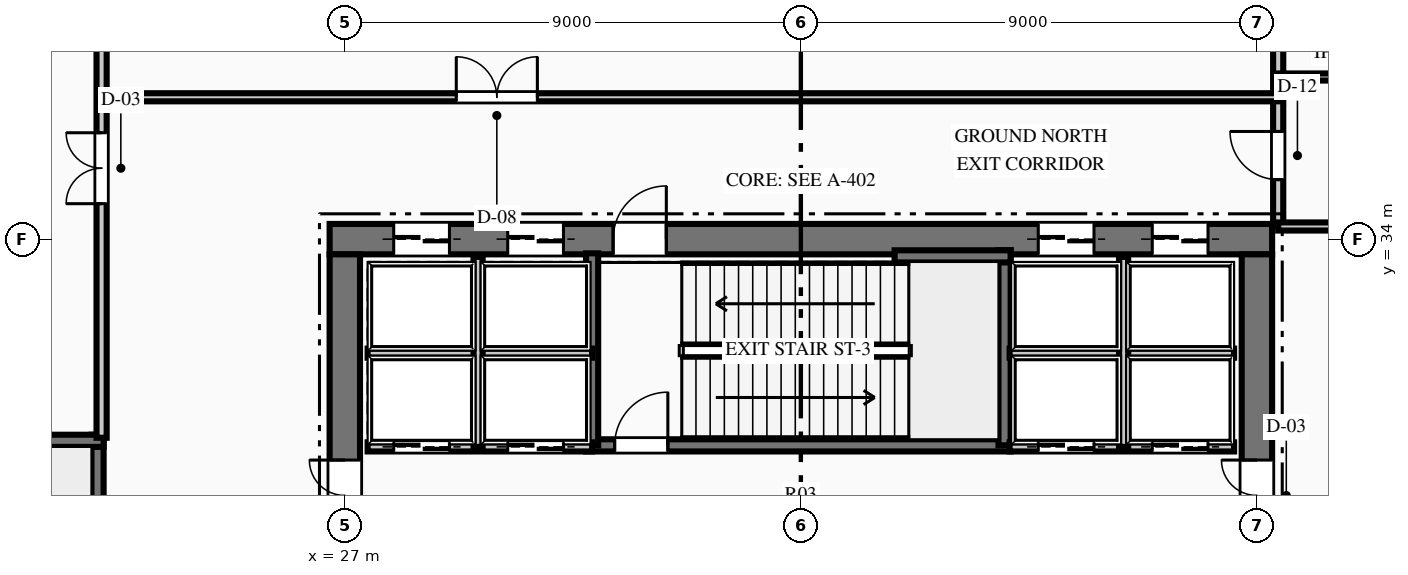
"""IFC4 building model, lengths in metres.
Left out: names, types, materials, properties, quantities, classifications, styles, units other than length and angle.
Written with IfcOpenShell. Run it as: python <this file> out.ifc"""

import sys

from ifc_helpers import new_model, si_unit, direction, frame, frame_2d, origin, place, context, subcontext, project, spatial, rectangle, extrude, element, fill, save


model = new_model("IFC4")
c1 = context("Model", 3, precision=1e-05, world=origin(), true_north=direction((0.0, 1.0)))
c2 = subcontext(c1, "Body", "Model", "MODEL_VIEW")
j1 = project(units=[si_unit("LENGTHUNIT", "METRE"), si_unit("PLANEANGLEUNIT", "RADIAN")], contexts=[c1])
p1 = place(None, origin())
s1 = spatial("IfcSite", under=j1, at=p1, CompositionType="ELEMENT")
p2 = place(p1, origin())
s2 = spatial("IfcBuilding", under=s1, at=p2, CompositionType="ELEMENT")
p3 = place(p2, origin())
s3 = spatial("IfcBuildingStorey", under=s2, at=p3, CompositionType="ELEMENT", Elevation=0.0)
p4 = place(p3, frame((26.7, 34.0, 0.0), z_axis=(0.0, 0.0, 1.0), x_axis=(1.0, 0.0, 0.0)))
e1 = element("IfcWall", 1, at=p4, inside=s3, PredefinedType="SHEAR", context=c2, shape_type="SweptSolid", body=[
    extrude(rectangle(XDim=18.6, YDim=0.6, at=frame_2d((9.3, 0.0))), origin(), (0.0, 0.0, 1.0), 6.0),
])
p5 = place(p4, frame((5.595, 0.0, 0.0)))
e2 = element("IfcOpeningElement", 2, at=p5, cuts=e1, PredefinedType="OPENING", context=c2, shape_type="SweptSolid", body=[
    extrude(rectangle(XDim=1.05, YDim=2.15, at=frame_2d((0.525, 1.075))), frame((0.0, 0.31, 0.0), z_axis=(0.0, -1.0, 0.0), x_axis=(1.0, 0.0, 0.0)), (0.0, 0.0, 1.0), 0.62),
])
p6 = place(p4, frame((1.265, 0.0, 0.0)))
e3 = element("IfcOpeningElement", 3, at=p6, cuts=e1, PredefinedType="OPENING", context=c2, shape_type="SweptSolid", body=[
    extrude(rectangle(XDim=1.1, YDim=2.15, at=frame_2d((0.55, 1.075))), frame((0.0, 0.31, 0.0), z_axis=(0.0, -1.0, 0.0), x_axis=(1.0, 0.0, 0.0)), (0.0, 0.0, 1.0), 0.62),
])
p7 = place(p4, frame((3.515, 0.0, 0.0)))
e4 = element("IfcOpeningElement", 4, at=p7, cuts=e1, PredefinedType="OPENING", context=c2, shape_type="SweptSolid", body=[
    extrude(rectangle(XDim=1.1, YDim=2.15, at=frame_2d((0.55, 1.075))), frame((0.0, 0.31, 0.0), z_axis=(0.0, -1.0, 0.0), x_axis=(1.0, 0.0, 0.0)), (0.0, 0.0, 1.0), 0.62),
])
p8 = place(p4, frame((13.985, 0.0, 0.0)))
e5 = element("IfcOpeningElement", 5, at=p8, cuts=e1, PredefinedType="OPENING", context=c2, shape_type="SweptSolid", body=[
    extrude(rectangle(XDim=1.1, YDim=2.15, at=frame_2d((0.55, 1.075))), frame((0.0, 0.31, 0.0), z_axis=(0.0, -1.0, 0.0), x_axis=(1.0, 0.0, 0.0)), (0.0, 0.0, 1.0), 0.62),
])
p9 = place(p4, frame((16.235, 0.0, 0.0)))
e6 = element("IfcOpeningElement", 6, at=p9, cuts=e1, PredefinedType="OPENING", context=c2, shape_type="SweptSolid", body=[
    extrude(rectangle(XDim=1.1, YDim=2.15, at=frame_2d((0.55, 1.075))), frame((0.0, 0.31, 0.0), z_axis=(0.0, -1.0, 0.0), x_axis=(1.0, 0.0, 0.0)), (0.0, 0.0, 1.0), 0.62),
])
p10 = place(p3, frame((27.0, 18.3, 0.0), z_axis=(0.0, 0.0, 1.0), x_axis=(0.0, 1.0, 0.0)))
e7 = element("IfcWall", 7, at=p10, inside=s3, PredefinedType="SHEAR", context=c2, shape_type="SweptSolid", body=[
    extrude(rectangle(XDim=15.4, YDim=0.6, at=frame_2d((7.7, 0.0))), origin(), (0.0, 0.0, 1.0), 6.0),
])
p11 = place(p10, frame((9.94, 0.0, 0.0)))
e8 = element("IfcOpeningElement", 8, at=p11, cuts=e7, PredefinedType="OPENING", context=c2, shape_type="SweptSolid", body=[
    extrude(rectangle(XDim=1.4, YDim=2.2, at=frame_2d((0.7, 1.1))), frame((0.0, 0.31, 0.0), z_axis=(0.0, -1.0, 0.0), x_axis=(1.0, 0.0, 0.0)), (0.0, 0.0, 1.0), 0.62),
])
p12 = place(p3, frame((45.0, 18.3, 0.0), z_axis=(0.0, 0.0, 1.0), x_axis=(0.0, 1.0, 0.0)))
e9 = element("IfcWall", 9, at=p12, inside=s3, PredefinedType="SHEAR", context=c2, shape_type="SweptSolid", body=[
    extrude(rectangle(XDim=15.4, YDim=0.6, at=frame_2d((7.7, 0.0))), origin(), (0.0, 0.0, 1.0), 6.0),
])
p13 = place(p12, frame((9.94, 0.0, 0.0)))
e10 = element("IfcOpeningElement", 10, at=p13, cuts=e9, PredefinedType="OPENING", context=c2, shape_type="SweptSolid", body=[
    extrude(rectangle(XDim=1.4, YDim=2.2, at=frame_2d((0.7, 1.1))), frame((0.0, 0.31, 0.0), z_axis=(0.0, -1.0, 0.0), x_axis=(1.0, 0.0, 0.0)), (0.0, 0.0, 1.0), 0.62),
])
p14 = place(p3, frame((31.76, 29.93, 0.0), z_axis=(0.0, 0.0, 1.0), x_axis=(1.0, 0.0, 0.0)))
e11 = element("IfcWall", 11, at=p14, inside=s3, PredefinedType="SHEAR", context=c2, shape_type="SweptSolid", body=[
    extrude(rectangle(XDim=8.38, YDim=0.24, at=frame_2d((4.19, 0.0))), origin(), (0.0, 0.0, 1.0), 6.0),
])
p15 = place(p14, frame((0.565, 0.0, 0.0)))
e12 = element("IfcOpeningElement", 12, at=p15, cuts=e11, PredefinedType="OPENING", context=c2, shape_type="SweptSolid", body=[
    extrude(rectangle(XDim=1.05, YDim=2.15, at=frame_2d((0.525, 1.075))), frame((0.0, 0.13, 0.0), z_axis=(0.0, -1.0, 0.0), x_axis=(1.0, 0.0, 0.0)), (0.0, 0.0, 1.0), 0.26),
])
p16 = place(p3, frame((31.88, 29.93, 0.0), z_axis=(0.0, 0.0, 1.0), x_axis=(0.0, 1.0, 0.0)))
e13 = element("IfcWall", 13, at=p16, inside=s3, PredefinedType="SHEAR", context=c2, shape_type="SweptSolid", body=[
    extrude(rectangle(XDim=3.79, YDim=0.24, at=frame_2d((1.895, 0.0))), origin(), (0.0, 0.0, 1.0), 6.0),
])
p17 = place(p3, frame((40.02, 29.93, 0.0), z_axis=(0.0, 0.0, 1.0), x_axis=(0.0, 1.0, 0.0)))
e14 = element("IfcWall", 14, at=p17, inside=s3, PredefinedType="SHEAR", context=c2, shape_type="SweptSolid", body=[
    extrude(rectangle(XDim=3.85, YDim=0.24, at=frame_2d((1.925, 0.0))), origin(), (0.0, 0.0, 1.0), 6.0),
])
p18 = place(p3, frame((37.85, 33.66, 0.0), z_axis=(0.0, 0.0, 1.0), x_axis=(1.0, 0.0, 0.0)))
e15 = element("IfcWall", 15, at=p18, inside=s3, PredefinedType="SHEAR", context=c2, shape_type="SweptSolid", body=[
    extrude(rectangle(XDim=2.29, YDim=0.24, at=frame_2d((1.145, 0.0))), origin(), (0.0, 0.0, 1.0), 6.0),
])
p19 = place(p3, frame((22.12, 21.76, 0.0), z_axis=(0.0, 0.0, 1.0), x_axis=(0.0, 1.0, 0.0)))
e16 = element("IfcWall", 16, at=p19, inside=s3, PredefinedType="SHEAR", context=c2, shape_type="SweptSolid", body=[
    extrude(rectangle(XDim=8.38, YDim=0.24, at=frame_2d((4.19, 0.0))), origin(), (0.0, 0.0, 1.0), 6.0),
])
p20 = place(p3, frame((18.26, 30.02, 0.0), z_axis=(0.0, 0.0, 1.0), x_axis=(1.0, 0.0, 0.0)))
e17 = element("IfcWall", 17, at=p20, inside=s3, PredefinedType="SHEAR", context=c2, shape_type="SweptSolid", body=[
    extrude(rectangle(XDim=3.98, YDim=0.24, at=frame_2d((1.99, 0.0))), origin(), (0.0, 0.0, 1.0), 6.0),
])
p21 = place(p3, frame((27.45, 29.9, 0.0), z_axis=(0.0, 0.0, 1.0), x_axis=(1.0, 0.0, 0.0)))
e18 = element("IfcWall", 18, at=p21, inside=s3, PredefinedType="PARTITIONING", context=c2, shape_type="SweptSolid", body=[
    extrude(rectangle(XDim=4.43, YDim=0.18, at=frame_2d((2.215, 0.0))), origin(), (0.0, 0.0, 1.0), 5.67),
])
p22 = place(p21, frame((0.515, 0.0, 0.0)))
e19 = element("IfcOpeningElement", 19, at=p22, cuts=e18, PredefinedType="OPENING", context=c2, shape_type="SweptSolid", body=[
    extrude(rectangle(XDim=1.1, YDim=2.15, at=frame_2d((0.55, 1.075))), frame((0.0, 0.1, 0.0), z_axis=(0.0, -1.0, 0.0), x_axis=(1.0, 0.0, 0.0)), (0.0, 0.0, 1.0), 0.2),
])
p23 = place(p21, frame((2.765, 0.0, 0.0)))
e20 = element("IfcOpeningElement", 20, at=p23, cuts=e18, PredefinedType="OPENING", context=c2, shape_type="SweptSolid", body=[
    extrude(rectangle(XDim=1.1, YDim=2.15, at=frame_2d((0.55, 1.075))), frame((0.0, 0.1, 0.0), z_axis=(0.0, -1.0, 0.0), x_axis=(1.0, 0.0, 0.0)), (0.0, 0.0, 1.0), 0.2),
])
p24 = place(p3, frame((27.45, 31.75, 0.0), z_axis=(0.0, 0.0, 1.0), x_axis=(1.0, 0.0, 0.0)))
e21 = element("IfcWall", 21, at=p24, inside=s3, PredefinedType="PARTITIONING", context=c2, shape_type="SweptSolid", body=[
    extrude(rectangle(XDim=4.43, YDim=0.18, at=frame_2d((2.215, 0.0))), origin(), (0.0, 0.0, 1.0), 5.67),
])
p25 = place(p3, frame((29.63, 29.9, 0.0), z_axis=(0.0, 0.0, 1.0), x_axis=(0.0, 1.0, 0.0)))
e22 = element("IfcWall", 22, at=p25, inside=s3, PredefinedType="PARTITIONING", context=c2, shape_type="SweptSolid", body=[
    extrude(rectangle(XDim=3.75, YDim=0.18, at=frame_2d((1.875, 0.0))), origin(), (0.0, 0.0, 1.0), 5.67),
])
p26 = place(p3, frame((40.12, 29.9, 0.0), z_axis=(0.0, 0.0, 1.0), x_axis=(1.0, 0.0, 0.0)))
e23 = element("IfcWall", 23, at=p26, inside=s3, PredefinedType="PARTITIONING", context=c2, shape_type="SweptSolid", body=[
    extrude(rectangle(XDim=4.43, YDim=0.18, at=frame_2d((2.215, 0.0))), origin(), (0.0, 0.0, 1.0), 5.67),
])
p27 = place(p26, frame((0.565, 0.0, 0.0)))
e24 = element("IfcOpeningElement", 24, at=p27, cuts=e23, PredefinedType="OPENING", context=c2, shape_type="SweptSolid", body=[
    extrude(rectangle(XDim=1.1, YDim=2.15, at=frame_2d((0.55, 1.075))), frame((0.0, 0.1, 0.0), z_axis=(0.0, -1.0, 0.0), x_axis=(1.0, 0.0, 0.0)), (0.0, 0.0, 1.0), 0.2),
])
p28 = place(p26, frame((2.815, 0.0, 0.0)))
e25 = element("IfcOpeningElement", 25, at=p28, cuts=e23, PredefinedType="OPENING", context=c2, shape_type="SweptSolid", body=[
    extrude(rectangle(XDim=1.1, YDim=2.15, at=frame_2d((0.55, 1.075))), frame((0.0, 0.1, 0.0), z_axis=(0.0, -1.0, 0.0), x_axis=(1.0, 0.0, 0.0)), (0.0, 0.0, 1.0), 0.2),
])
p29 = place(p3, frame((40.12, 31.75, 0.0), z_axis=(0.0, 0.0, 1.0), x_axis=(1.0, 0.0, 0.0)))
e26 = element("IfcWall", 26, at=p29, inside=s3, PredefinedType="PARTITIONING", context=c2, shape_type="SweptSolid", body=[
    extrude(rectangle(XDim=4.43, YDim=0.18, at=frame_2d((2.215, 0.0))), origin(), (0.0, 0.0, 1.0), 5.67),
])
p30 = place(p3, frame((42.37, 29.9, 0.0), z_axis=(0.0, 0.0, 1.0), x_axis=(0.0, 1.0, 0.0)))
e27 = element("IfcWall", 27, at=p30, inside=s3, PredefinedType="PARTITIONING", context=c2, shape_type="SweptSolid", body=[
    extrude(rectangle(XDim=3.75, YDim=0.18, at=frame_2d((1.875, 0.0))), origin(), (0.0, 0.0, 1.0), 5.67),
])
p31 = place(p3, frame((22.2, 30.08, 0.0), z_axis=(0.0, 0.0, 1.0), x_axis=(0.0, 1.0, 0.0)))
e28 = element("IfcWall", 28, at=p31, inside=s3, PredefinedType="PARTITIONING", context=c2, shape_type="SweptSolid", body=[
    extrude(rectangle(XDim=19.37, YDim=0.2, at=frame_2d((9.685, 0.0))), origin(), (0.0, 0.0, 1.0), 5.67),
])
p32 = place(p31, frame((4.62, 0.0, 0.0)))
e29 = element("IfcOpeningElement", 29, at=p32, cuts=e28, PredefinedType="OPENING", context=c2, shape_type="SweptSolid", body=[
    extrude(rectangle(XDim=1.4, YDim=2.2, at=frame_2d((0.7, 1.1))), frame((0.0, 0.11, 0.0), z_axis=(0.0, -1.0, 0.0), x_axis=(1.0, 0.0, 0.0)), (0.0, 0.0, 1.0), 0.22),
])
p33 = place(p3, frame((45.42, 34.25, 0.0), z_axis=(0.0, 0.0, 1.0), x_axis=(0.0, 1.0, 0.0)))
e30 = element("IfcWall", 30, at=p33, inside=s3, PredefinedType="PARTITIONING", context=c2, shape_type="SweptSolid", body=[
    extrude(rectangle(XDim=15.2, YDim=0.2, at=frame_2d((7.6, 0.0))), origin(), (0.0, 0.0, 1.0), 4.803),
])
p34 = place(p33, frame((0.925, 0.0, 0.0)))
e31 = element("IfcOpeningElement", 31, at=p34, cuts=e30, PredefinedType="OPENING", context=c2, shape_type="SweptSolid", body=[
    extrude(rectangle(XDim=0.95, YDim=2.15, at=frame_2d((0.475, 1.075))), frame((0.0, 0.11, 0.0), z_axis=(0.0, -1.0, 0.0), x_axis=(1.0, 0.0, 0.0)), (0.0, 0.0, 1.0), 0.22),
])
p35 = place(p33, frame((4.025, 0.0, 0.0)))
e32 = element("IfcOpeningElement", 32, at=p35, cuts=e30, PredefinedType="OPENING", context=c2, shape_type="SweptSolid", body=[
    extrude(rectangle(XDim=0.95, YDim=2.15, at=frame_2d((0.475, 1.075))), frame((0.0, 0.11, 0.0), z_axis=(0.0, -1.0, 0.0), x_axis=(1.0, 0.0, 0.0)), (0.0, 0.0, 1.0), 0.22),
])
p36 = place(p33, frame((7.0, 0.0, 0.0)))
e33 = element("IfcOpeningElement", 33, at=p36, cuts=e30, PredefinedType="OPENING", context=c2, shape_type="SweptSolid", body=[
    extrude(rectangle(XDim=1.0, YDim=2.15, at=frame_2d((0.5, 1.075))), frame((0.0, 0.11, 0.0), z_axis=(0.0, -1.0, 0.0), x_axis=(1.0, 0.0, 0.0)), (0.0, 0.0, 1.0), 0.22),
])
p37 = place(p3, frame((45.42, 34.25, 0.0), z_axis=(0.0, 0.0, 1.0), x_axis=(1.0, 0.0, 0.0)))
e34 = element("IfcWall", 34, at=p37, inside=s3, PredefinedType="PARTITIONING", context=c2, shape_type="SweptSolid", body=[
    extrude(rectangle(XDim=4.38, YDim=0.16, at=frame_2d((2.19, 0.0))), origin(), (0.0, 0.0, 1.0), 4.803),
])
p38 = place(p3, frame((45.42, 37.2, 0.0), z_axis=(0.0, 0.0, 1.0), x_axis=(1.0, 0.0, 0.0)))
e35 = element("IfcWall", 35, at=p38, inside=s3, PredefinedType="PARTITIONING", context=c2, shape_type="SweptSolid", body=[
    extrude(rectangle(XDim=4.38, YDim=0.14, at=frame_2d((2.19, 0.0))), origin(), (0.0, 0.0, 1.0), 5.67),
])
p39 = place(p3, frame((22.2, 36.8, 0.0), z_axis=(0.0, 0.0, 1.0), x_axis=(1.0, 0.0, 0.0)))
e36 = element("IfcWall", 36, at=p39, inside=s3, PredefinedType="PARTITIONING", context=c2, shape_type="SweptSolid", body=[
    extrude(rectangle(XDim=23.22, YDim=0.16, at=frame_2d((11.61, 0.0))), origin(), (0.0, 0.0, 1.0), 5.67),
])
p40 = place(p39, frame((7.0, 0.0, 0.0)))
e37 = element("IfcOpeningElement", 37, at=p40, cuts=e36, PredefinedType="OPENING", context=c2, shape_type="SweptSolid", body=[
    extrude(rectangle(XDim=1.6, YDim=2.2, at=frame_2d((0.8, 1.1))), frame((0.0, 0.09, 0.0), z_axis=(0.0, -1.0, 0.0), x_axis=(1.0, 0.0, 0.0)), (0.0, 0.0, 1.0), 0.18),
])
p41 = place(p15, origin())
e38 = element("IfcDoor", 38, at=p41, inside=s3, OperationType="SINGLE_SWING_RIGHT", PredefinedType="DOOR", context=c2, shape_type="SweptSolid", body=[
    extrude(rectangle(XDim=1.05, YDim=2.15, at=frame_2d((0.525, 1.075))), frame((0.0, 0.025, 0.0), z_axis=(0.0, -1.0, 0.0), x_axis=(1.0, 0.0, 0.0)), (0.0, 0.0, 1.0), 0.05),
])
fill(e12, e38)
p42 = place(p11, origin())
e39 = element("IfcDoor", 39, at=p42, inside=s3, OperationType="DOUBLE_DOOR_SINGLE_SWING", PredefinedType="DOOR", context=c2, shape_type="SweptSolid", body=[
    extrude(rectangle(XDim=1.4, YDim=2.2, at=frame_2d((0.7, 1.1))), frame((0.0, 0.025, 0.0), z_axis=(0.0, -1.0, 0.0), x_axis=(1.0, 0.0, 0.0)), (0.0, 0.0, 1.0), 0.05),
])
fill(e8, e39)
p43 = place(p13, origin())
e40 = element("IfcDoor", 40, at=p43, inside=s3, OperationType="DOUBLE_DOOR_SINGLE_SWING", PredefinedType="DOOR", context=c2, shape_type="SweptSolid", body=[
    extrude(rectangle(XDim=1.4, YDim=2.2, at=frame_2d((0.7, 1.1))), frame((0.0, 0.025, 0.0), z_axis=(0.0, -1.0, 0.0), x_axis=(1.0, 0.0, 0.0)), (0.0, 0.0, 1.0), 0.05),
])
fill(e10, e40)
p44 = place(p5, origin())
e41 = element("IfcDoor", 41, at=p44, inside=s3, OperationType="SINGLE_SWING_RIGHT", PredefinedType="DOOR", context=c2, shape_type="SweptSolid", body=[
    extrude(rectangle(XDim=1.05, YDim=2.15, at=frame_2d((0.525, 1.075))), frame((0.0, 0.025, 0.0), z_axis=(0.0, -1.0, 0.0), x_axis=(1.0, 0.0, 0.0)), (0.0, 0.0, 1.0), 0.05),
])
fill(e2, e41)
p45 = place(p32, origin())
e42 = element("IfcDoor", 42, at=p45, inside=s3, OperationType="DOUBLE_DOOR_SINGLE_SWING", PredefinedType="DOOR", context=c2, shape_type="SweptSolid", body=[
    extrude(rectangle(XDim=1.4, YDim=2.2, at=frame_2d((0.7, 1.1))), frame((0.0, 0.025, 0.0), z_axis=(0.0, -1.0, 0.0), x_axis=(1.0, 0.0, 0.0)), (0.0, 0.0, 1.0), 0.05),
])
fill(e29, e42)
p46 = place(p34, origin())
e43 = element("IfcDoor", 43, at=p46, inside=s3, OperationType="SINGLE_SWING_RIGHT", PredefinedType="DOOR", context=c2, shape_type="SweptSolid", body=[
    extrude(rectangle(XDim=0.95, YDim=2.15, at=frame_2d((0.475, 1.075))), frame((0.0, 0.025, 0.0), z_axis=(0.0, -1.0, 0.0), x_axis=(1.0, 0.0, 0.0)), (0.0, 0.0, 1.0), 0.05),
])
fill(e31, e43)
p47 = place(p40, origin())
e44 = element("IfcDoor", 44, at=p47, inside=s3, OperationType="DOUBLE_DOOR_SINGLE_SWING", PredefinedType="DOOR", context=c2, shape_type="SweptSolid", body=[
    extrude(rectangle(XDim=1.6, YDim=2.2, at=frame_2d((0.8, 1.1))), frame((0.0, 0.025, 0.0), z_axis=(0.0, -1.0, 0.0), x_axis=(1.0, 0.0, 0.0)), (0.0, 0.0, 1.0), 0.05),
])
fill(e37, e44)
p48 = place(p22, origin())
e45 = element("IfcDoor", 45, at=p48, inside=s3, OperationType="SLIDING_TO_LEFT", PredefinedType="DOOR", context=c2, shape_type="SweptSolid", body=[
    extrude(rectangle(XDim=1.1, YDim=2.15, at=frame_2d((0.55, 1.075))), frame((0.0, 0.025, 0.0), z_axis=(0.0, -1.0, 0.0), x_axis=(1.0, 0.0, 0.0)), (0.0, 0.0, 1.0), 0.05),
])
fill(e19, e45)
p49 = place(p23, origin())
e46 = element("IfcDoor", 46, at=p49, inside=s3, OperationType="SLIDING_TO_LEFT", PredefinedType="DOOR", context=c2, shape_type="SweptSolid", body=[
    extrude(rectangle(XDim=1.1, YDim=2.15, at=frame_2d((0.55, 1.075))), frame((0.0, 0.025, 0.0), z_axis=(0.0, -1.0, 0.0), x_axis=(1.0, 0.0, 0.0)), (0.0, 0.0, 1.0), 0.05),
])
fill(e20, e46)
p50 = place(p6, origin())
e47 = element("IfcDoor", 47, at=p50, inside=s3, OperationType="SLIDING_TO_LEFT", PredefinedType="DOOR", context=c2, shape_type="SweptSolid", body=[
    extrude(rectangle(XDim=1.1, YDim=2.15, at=frame_2d((0.55, 1.075))), frame((0.0, 0.025, 0.0), z_axis=(0.0, -1.0, 0.0), x_axis=(1.0, 0.0, 0.0)), (0.0, 0.0, 1.0), 0.05),
])
fill(e3, e47)
p51 = place(p7, origin())
e48 = element("IfcDoor", 48, at=p51, inside=s3, OperationType="SLIDING_TO_LEFT", PredefinedType="DOOR", context=c2, shape_type="SweptSolid", body=[
    extrude(rectangle(XDim=1.1, YDim=2.15, at=frame_2d((0.55, 1.075))), frame((0.0, 0.025, 0.0), z_axis=(0.0, -1.0, 0.0), x_axis=(1.0, 0.0, 0.0)), (0.0, 0.0, 1.0), 0.05),
])
fill(e4, e48)
p52 = place(p27, origin())
e49 = element("IfcDoor", 49, at=p52, inside=s3, OperationType="SLIDING_TO_LEFT", PredefinedType="DOOR", context=c2, shape_type="SweptSolid", body=[
    extrude(rectangle(XDim=1.1, YDim=2.15, at=frame_2d((0.55, 1.075))), frame((0.0, 0.025, 0.0), z_axis=(0.0, -1.0, 0.0), x_axis=(1.0, 0.0, 0.0)), (0.0, 0.0, 1.0), 0.05),
])
fill(e24, e49)
p53 = place(p28, origin())
e50 = element("IfcDoor", 50, at=p53, inside=s3, OperationType="SLIDING_TO_LEFT", PredefinedType="DOOR", context=c2, shape_type="SweptSolid", body=[
    extrude(rectangle(XDim=1.1, YDim=2.15, at=frame_2d((0.55, 1.075))), frame((0.0, 0.025, 0.0), z_axis=(0.0, -1.0, 0.0), x_axis=(1.0, 0.0, 0.0)), (0.0, 0.0, 1.0), 0.05),
])
fill(e25, e50)
p54 = place(p8, origin())
e51 = element("IfcDoor", 51, at=p54, inside=s3, OperationType="SLIDING_TO_LEFT", PredefinedType="DOOR", context=c2, shape_type="SweptSolid", body=[
    extrude(rectangle(XDim=1.1, YDim=2.15, at=frame_2d((0.55, 1.075))), frame((0.0, 0.025, 0.0), z_axis=(0.0, -1.0, 0.0), x_axis=(1.0, 0.0, 0.0)), (0.0, 0.0, 1.0), 0.05),
])
fill(e5, e51)
p55 = place(p9, origin())
e52 = element("IfcDoor", 52, at=p55, inside=s3, OperationType="SLIDING_TO_LEFT", PredefinedType="DOOR", context=c2, shape_type="SweptSolid", body=[
    extrude(rectangle(XDim=1.1, YDim=2.15, at=frame_2d((0.55, 1.075))), frame((0.0, 0.025, 0.0), z_axis=(0.0, -1.0, 0.0), x_axis=(1.0, 0.0, 0.0)), (0.0, 0.0, 1.0), 0.05),
])
fill(e6, e52)
save(model, sys.argv[1])
